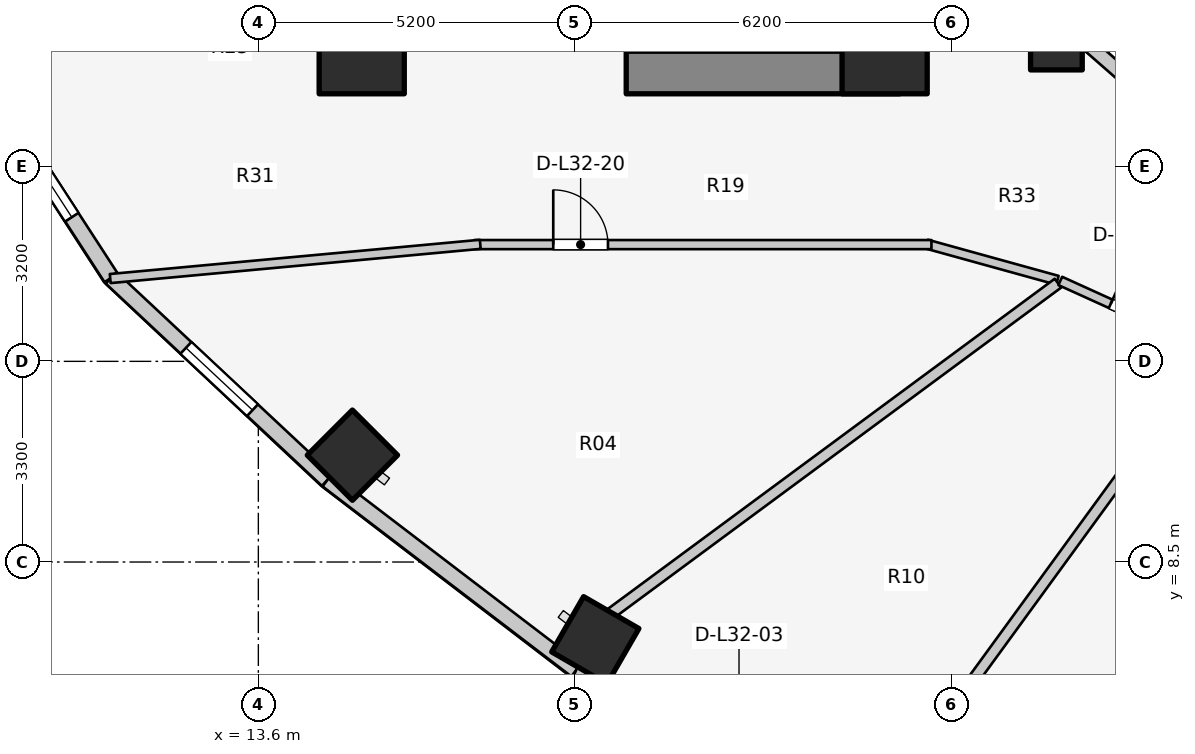
"""IFC4 building model, lengths in metres.
Left out: names, types, materials, properties, quantities, classifications, styles, units other than length and angle.
Written with IfcOpenShell. Run it as: python <this file> out.ifc"""

import sys

from ifc_helpers import new_model, si_unit, direction, frame, frame_2d, origin, origin_2d, place, context, subcontext, project, spatial, rectangle, extrude, element, fill, save


model = new_model("IFC4")
c1 = context("Model", 3, precision=1e-05, world=origin(), true_north=direction((0.0, 1.0)))
c2 = subcontext(c1, "Body", "Model", "MODEL_VIEW")
j1 = project(units=[si_unit("LENGTHUNIT", "METRE"), si_unit("PLANEANGLEUNIT", "RADIAN")], contexts=[c1])
p1 = place(None, origin())
s1 = spatial("IfcSite", under=j1, at=p1, CompositionType="ELEMENT")
p2 = place(p1, origin())
s2 = spatial("IfcBuilding", under=s1, at=p2, CompositionType="ELEMENT")
p3 = place(p2, frame((0.0, 0.0, 107.3)))
s3 = spatial("IfcBuildingStorey", under=s2, at=p3, CompositionType="ELEMENT", Elevation=107.3)
p4 = place(p3, frame((19.65, 16.55, 0.0), z_axis=(0.0, 0.0, 1.0), x_axis=(1.0, 0.0, 0.0)))
e1 = element("IfcWall", 1, at=p4, inside=s3, PredefinedType="SHEAR", context=c2, shape_type="SweptSolid", body=[
    extrude(rectangle(XDim=4.5, YDim=0.7, at=frame_2d((2.25, 0.0))), origin(), (0.0, 0.0, 1.0), 3.1),
])
for number, where, z_axis, x_axis in (
    (2, (15.3, 16.9, 0.0), (0.0, 0.0, 1.0), (1.0, 0.0, 0.0)),
    (3, (23.9, 16.9, 0.0), (0.0, 0.0, 1.0), (1.0, 0.0, 0.0)),
):
    element("IfcColumn", number, at=place(p3, frame(where, z_axis=z_axis, x_axis=x_axis)), inside=s3, PredefinedType="COLUMN", context=c2, shape_type="SweptSolid", body=[
        extrude(rectangle(XDim=1.4, YDim=1.4, at=origin_2d()), origin(), (0.0, 0.0, 1.0), 3.1),
    ])
p5 = place(p3, frame((26.725, 17.018, 0.0), z_axis=(0.0, 0.0, 1.0), x_axis=(1.0, 0.0, 0.0)))
e4 = element("IfcColumn", 4, at=p5, inside=s3, PredefinedType="COLUMN", context=c2, shape_type="SweptSolid", body=[
    extrude(rectangle(XDim=0.85, YDim=0.85, at=origin_2d()), origin(), (0.0, 0.0, 1.0), 3.1),
])
for number, where, z_axis, x_axis in (
    (5, (15.147, 10.257, 0.0), (0.0, 0.0, 1.0), (-0.707, -0.707, 0.0)),
    (6, (19.142, 7.214, 0.0), (0.0, 0.0, 1.0), (-0.5, -0.866, 0.0)),
):
    element("IfcColumn", number, at=place(p3, frame(where, z_axis=z_axis, x_axis=x_axis)), inside=s3, PredefinedType="COLUMN", context=c2, shape_type="SweptSolid", body=[
        extrude(rectangle(XDim=1.05, YDim=1.05, at=origin_2d()), origin(), (0.0, 0.0, 1.0), 3.1),
    ])
p6 = place(p3, frame((26.965, 17.258, 0.0), z_axis=(0.0, 0.0, 1.0), x_axis=(0.752576694707, -0.658504607869, 0.0)))
e7 = element("IfcWall", 7, at=p6, inside=s3, PredefinedType="STANDARD", context=c2, shape_type="SweptSolid", body=[
    extrude(rectangle(XDim=1.959, YDim=0.23, at=frame_2d((0.98, 0.0))), origin(), (0.0, 0.0, 1.0), 2.16),
])
p7 = place(p3, frame((8.578, 17.181, 0.0), z_axis=(0.0, 0.0, 1.0), x_axis=(0.544388392991, -0.838833283541, 0.0)))
e8 = element("IfcWall", 8, at=p7, inside=s3, PredefinedType="STANDARD", context=c2, shape_type="SweptSolid", body=[
    extrude(rectangle(XDim=4.778, YDim=0.26, at=frame_2d((2.389, 0.0))), origin(), (0.0, 0.0, 1.0), 2.85),
])
p8 = place(p7, frame((1.189, 0.0, 0.75)))
e9 = element("IfcOpeningElement", 9, at=p8, cuts=e8, PredefinedType="OPENING", context=c2, shape_type="SweptSolid", body=[
    extrude(rectangle(XDim=2.4, YDim=1.7, at=frame_2d((1.2, 0.85))), frame((0.0, 0.14, 0.0), z_axis=(0.0, -1.0, 0.0), x_axis=(1.0, 0.0, 0.0)), (0.0, 0.0, 1.0), 0.28),
])
p9 = place(p3, frame((11.179, 13.173, 0.0), z_axis=(0.0, 0.0, 1.0), x_axis=(0.730162452258, -0.68327358599, 0.0)))
e10 = element("IfcWall", 10, at=p9, inside=s3, PredefinedType="STANDARD", context=c2, shape_type="SweptSolid", body=[
    extrude(rectangle(XDim=4.868, YDim=0.26, at=frame_2d((2.434, 0.0))), origin(), (0.0, 0.0, 1.0), 2.85),
])
p10 = place(p9, frame((1.684, 0.0, 0.75)))
e11 = element("IfcOpeningElement", 11, at=p10, cuts=e10, PredefinedType="OPENING", context=c2, shape_type="SweptSolid", body=[
    extrude(rectangle(XDim=1.5, YDim=1.6, at=frame_2d((0.75, 0.8))), frame((0.0, 0.14, 0.0), z_axis=(0.0, -1.0, 0.0), x_axis=(1.0, 0.0, 0.0)), (0.0, 0.0, 1.0), 0.28),
])
p11 = place(p3, frame((14.734, 9.847, 0.0), z_axis=(0.0, 0.0, 1.0), x_axis=(0.794809810864, -0.606858603427, 0.0)))
e12 = element("IfcWall", 12, at=p11, inside=s3, PredefinedType="STANDARD", context=c2, shape_type="SweptSolid", body=[
    extrude(rectangle(XDim=5.149, YDim=0.26, at=frame_2d((2.575, 0.0))), origin(), (0.0, 0.0, 1.0), 2.85),
])
p12 = place(p3, frame((18.827, 6.722, 0.0), z_axis=(0.0, 0.0, 1.0), x_axis=(0.914336605747, -0.404955023911, 0.0)))
e13 = element("IfcWall", 13, at=p12, inside=s3, PredefinedType="STANDARD", context=c2, shape_type="SweptSolid", body=[
    extrude(rectangle(XDim=5.859, YDim=0.26, at=frame_2d((2.929, 0.0))), origin(), (0.0, 0.0, 1.0), 2.88),
])
p13 = place(p12, frame((2.329, 0.0, 0.0)))
e14 = element("IfcOpeningElement", 14, at=p13, cuts=e13, PredefinedType="OPENING", context=c2, shape_type="SweptSolid", body=[
    extrude(rectangle(XDim=1.2, YDim=2.2, at=frame_2d((0.6, 1.1))), frame((0.0, 0.14, 0.0), z_axis=(0.0, -1.0, 0.0), x_axis=(1.0, 0.0, 0.0)), (0.0, 0.0, 1.0), 0.28),
])
p14 = place(p3, frame((26.742, 13.133, 0.0), z_axis=(0.0, 0.0, 1.0), x_axis=(-0.963833843713, 0.266503886865, 0.0)))
e15 = element("IfcWall", 15, at=p14, inside=s3, PredefinedType="PARTITIONING", context=c2, shape_type="SweptSolid", body=[
    extrude(rectangle(XDim=2.232, YDim=0.15, at=frame_2d((1.116, 0.0))), origin(), (0.0, 0.0, 1.0), 2.272),
])
p15 = place(p3, frame((17.15, 13.72, 0.0), z_axis=(0.0, 0.0, 1.0), x_axis=(1.0, 0.0, 0.0)))
e16 = element("IfcWall", 16, at=p15, inside=s3, PredefinedType="PARTITIONING", context=c2, shape_type="SweptSolid", body=[
    extrude(rectangle(XDim=7.52, YDim=0.15, at=frame_2d((3.76, 0.0))), origin(), (0.0, 0.0, 1.0), 2.272),
])
p16 = place(p15, frame((1.3, 0.0, 0.0)))
e17 = element("IfcOpeningElement", 17, at=p16, cuts=e16, PredefinedType="OPENING", context=c2, shape_type="SweptSolid", body=[
    extrude(rectangle(XDim=0.9, YDim=2.1, at=frame_2d((0.45, 1.05))), frame((0.0, 0.085, 0.0), z_axis=(0.0, -1.0, 0.0), x_axis=(1.0, 0.0, 0.0)), (0.0, 0.0, 1.0), 0.17),
])
p17 = place(p3, frame((17.25, 13.725, 0.0), z_axis=(0.0, 0.0, 1.0), x_axis=(-0.995748209098, -0.092116795851, 0.0)))
e18 = element("IfcWall", 18, at=p17, inside=s3, PredefinedType="PARTITIONING", context=c2, shape_type="SweptSolid", body=[
    extrude(rectangle(XDim=6.112, YDim=0.15, at=frame_2d((3.056, 0.0))), origin(), (0.0, 0.0, 1.0), 2.142),
])
p18 = place(p3, frame((26.751, 13.086, 0.0), z_axis=(0.0, 0.0, 1.0), x_axis=(-0.80430981394, -0.594210167533, 0.0)))
e19 = element("IfcWall", 19, at=p18, inside=s3, PredefinedType="PARTITIONING", context=c2, shape_type="SweptSolid", body=[
    extrude(rectangle(XDim=9.146, YDim=0.18, at=frame_2d((4.573, 0.0))), origin(), (0.0, 0.0, 1.0), 2.272),
])
p19 = place(p3, frame((29.273, 11.934, 0.0), z_axis=(0.0, 0.0, 1.0), x_axis=(-0.589042211476, -0.808102266486, 0.0)))
e20 = element("IfcWall", 20, at=p19, inside=s3, PredefinedType="PARTITIONING", context=c2, shape_type="SweptSolid", body=[
    extrude(rectangle(XDim=8.101, YDim=0.18, at=frame_2d((4.051, 0.0))), origin(), (0.0, 0.0, 1.0), 2.272),
])
p20 = place(p3, frame((26.789, 13.123, 0.0), z_axis=(0.0, 0.0, 1.0), x_axis=(0.910568469686, -0.41335827319, 0.0)))
e21 = element("IfcWall", 21, at=p20, inside=s3, PredefinedType="PARTITIONING", context=c2, shape_type="SweptSolid", body=[
    extrude(rectangle(XDim=2.772, YDim=0.15, at=frame_2d((1.386, 0.0))), origin(), (0.0, 0.0, 1.0), 2.272),
])
p21 = place(p20, frame((0.911, 0.0, 0.0)))
e22 = element("IfcOpeningElement", 22, at=p21, cuts=e21, PredefinedType="OPENING", context=c2, shape_type="SweptSolid", body=[
    extrude(rectangle(XDim=0.95, YDim=2.1, at=frame_2d((0.475, 1.05))), frame((0.0, 0.085, 0.0), z_axis=(0.0, -1.0, 0.0), x_axis=(1.0, 0.0, 0.0)), (0.0, 0.0, 1.0), 0.17),
])
p22 = place(p8, origin())
e23 = element("IfcWindow", 23, at=p22, inside=s3, PartitioningType="SINGLE_PANEL", PredefinedType="WINDOW", context=c2, shape_type="SweptSolid", body=[
    extrude(rectangle(XDim=2.4, YDim=1.7, at=frame_2d((1.2, 0.85))), frame((0.0, 0.03, 0.0), z_axis=(0.0, -1.0, 0.0), x_axis=(1.0, 0.0, 0.0)), (0.0, 0.0, 1.0), 0.06),
])
fill(e9, e23)
p23 = place(p10, origin())
e24 = element("IfcWindow", 24, at=p23, inside=s3, PartitioningType="SINGLE_PANEL", PredefinedType="WINDOW", context=c2, shape_type="SweptSolid", body=[
    extrude(rectangle(XDim=1.5, YDim=1.6, at=frame_2d((0.75, 0.8))), frame((0.0, 0.03, 0.0), z_axis=(0.0, -1.0, 0.0), x_axis=(1.0, 0.0, 0.0)), (0.0, 0.0, 1.0), 0.06),
])
fill(e11, e24)
p24 = place(p16, origin())
e25 = element("IfcDoor", 25, at=p24, inside=s3, OperationType="SINGLE_SWING_LEFT", PredefinedType="DOOR", context=c2, shape_type="SweptSolid", body=[
    extrude(rectangle(XDim=0.9, YDim=2.1, at=frame_2d((0.45, 1.05))), frame((0.0, 0.025, 0.0), z_axis=(0.0, -1.0, 0.0), x_axis=(1.0, 0.0, 0.0)), (0.0, 0.0, 1.0), 0.05),
])
fill(e17, e25)
p25 = place(p21, origin())
e26 = element("IfcDoor", 26, at=p25, inside=s3, OperationType="SINGLE_SWING_LEFT", PredefinedType="DOOR", context=c2, shape_type="SweptSolid", body=[
    extrude(rectangle(XDim=0.95, YDim=2.1, at=frame_2d((0.475, 1.05))), frame((0.0, 0.025, 0.0), z_axis=(0.0, -1.0, 0.0), x_axis=(1.0, 0.0, 0.0)), (0.0, 0.0, 1.0), 0.05),
])
fill(e22, e26)
save(model, sys.argv[1])
